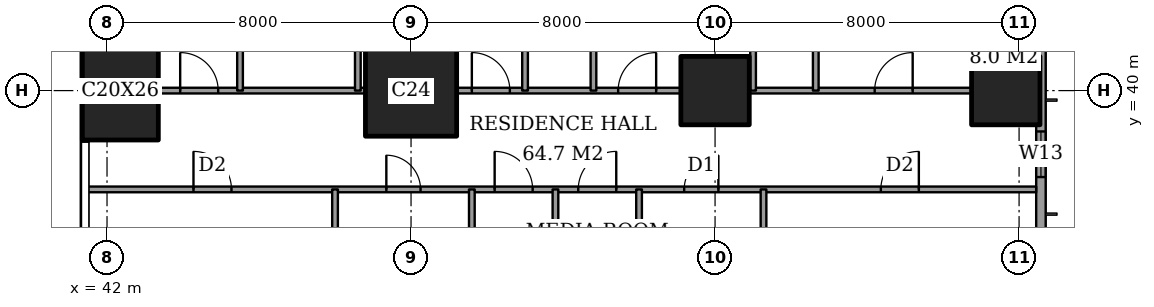
"""IFC4 building model, lengths in metres.
Left out: names, types, materials, properties, quantities, classifications, styles, units other than length and angle.
Written with IfcOpenShell. Run it as: python <this file> out.ifc"""

import sys

from ifc_helpers import new_model, si_unit, direction, frame, frame_2d, origin, origin_2d, place, context, subcontext, project, spatial, rectangle, extrude, element, fill, save


model = new_model("IFC4")
c1 = context("Model", 3, precision=1e-05, world=origin(), true_north=direction((0.0, 1.0)))
c2 = subcontext(c1, "Body", "Model", "MODEL_VIEW")
j1 = project(units=[si_unit("LENGTHUNIT", "METRE"), si_unit("PLANEANGLEUNIT", "RADIAN")], contexts=[c1])
p1 = place(None, origin())
s1 = spatial("IfcSite", under=j1, at=p1, CompositionType="ELEMENT")
p2 = place(p1, origin())
s2 = spatial("IfcBuilding", under=s1, at=p2, CompositionType="ELEMENT")
p3 = place(p2, frame((0.0, 0.0, 214.6)))
s3 = spatial("IfcBuildingStorey", under=s2, at=p3, CompositionType="ELEMENT", Elevation=214.6)
p4 = place(p3, frame((42.35, 40.0, 0.0), z_axis=(0.0, 0.0, 1.0), x_axis=(1.0, 0.0, 0.0)))
e1 = element("IfcColumn", 1, at=p4, inside=s3, PredefinedType="COLUMN", context=c2, shape_type="SweptSolid", body=[
    extrude(rectangle(XDim=2.0, YDim=2.6, at=origin_2d()), origin(), (0.0, 0.0, 1.0), 3.6),
])
p5 = place(p3, frame((50.0, 40.0, 0.0), z_axis=(0.0, 0.0, 1.0), x_axis=(1.0, 0.0, 0.0)))
e2 = element("IfcColumn", 2, at=p5, inside=s3, PredefinedType="COLUMN", context=c2, shape_type="SweptSolid", body=[
    extrude(rectangle(XDim=2.4, YDim=2.4, at=origin_2d()), origin(), (0.0, 0.0, 1.0), 3.6),
])
for number, where, z_axis, x_axis in (
    (3, (58.0, 40.0, 0.0), (0.0, 0.0, 1.0), (1.0, 0.0, 0.0)),
    (4, (65.65, 40.0, 0.0), (0.0, 0.0, 1.0), (1.0, 0.0, 0.0)),
):
    element("IfcColumn", number, at=place(p3, frame(where, z_axis=z_axis, x_axis=x_axis)), inside=s3, PredefinedType="COLUMN", context=c2, shape_type="SweptSolid", body=[
        extrude(rectangle(XDim=1.8, YDim=1.8, at=origin_2d()), origin(), (0.0, 0.0, 1.0), 3.6),
    ])
p6 = place(p3, frame((66.575, 3.175, 0.0), z_axis=(0.0, 0.0, 1.0), x_axis=(0.0, 1.0, 0.0)))
e5 = element("IfcWall", 5, at=p6, inside=s3, PredefinedType="SOLIDWALL", context=c2, shape_type="SweptSolid", body=[
    extrude(rectangle(XDim=41.65, YDim=0.25, at=frame_2d((20.825, 0.0))), origin(), (0.0, 0.0, 1.0), 3.6),
])
p7 = place(p6, frame((0.825, 0.0, 0.2)))
e6 = element("IfcOpeningElement", 6, at=p7, cuts=e5, PredefinedType="OPENING", context=c2, shape_type="SweptSolid", body=[
    extrude(rectangle(XDim=2.4, YDim=2.4, at=frame_2d((1.2, 1.2))), frame((0.0, 0.135, 0.0), z_axis=(0.0, -1.0, 0.0), x_axis=(1.0, 0.0, 0.0)), (0.0, 0.0, 1.0), 0.27),
])
p8 = place(p6, frame((6.225, 0.0, 0.2)))
e7 = element("IfcOpeningElement", 7, at=p8, cuts=e5, PredefinedType="OPENING", context=c2, shape_type="SweptSolid", body=[
    extrude(rectangle(XDim=1.2, YDim=2.4, at=frame_2d((0.6, 1.2))), frame((0.0, 0.135, 0.0), z_axis=(0.0, -1.0, 0.0), x_axis=(1.0, 0.0, 0.0)), (0.0, 0.0, 1.0), 0.27),
])
p9 = place(p6, frame((8.675, 0.0, 0.2)))
e8 = element("IfcOpeningElement", 8, at=p9, cuts=e5, PredefinedType="OPENING", context=c2, shape_type="SweptSolid", body=[
    extrude(rectangle(XDim=2.4, YDim=2.4, at=frame_2d((1.2, 1.2))), frame((0.0, 0.135, 0.0), z_axis=(0.0, -1.0, 0.0), x_axis=(1.0, 0.0, 0.0)), (0.0, 0.0, 1.0), 0.27),
])
p10 = place(p6, frame((15.675, 0.0, 0.2)))
e9 = element("IfcOpeningElement", 9, at=p10, cuts=e5, PredefinedType="OPENING", context=c2, shape_type="SweptSolid", body=[
    extrude(rectangle(XDim=2.4, YDim=2.4, at=frame_2d((1.2, 1.2))), frame((0.0, 0.135, 0.0), z_axis=(0.0, -1.0, 0.0), x_axis=(1.0, 0.0, 0.0)), (0.0, 0.0, 1.0), 0.27),
])
p11 = place(p6, frame((23.575, 0.0, 0.2)))
e10 = element("IfcOpeningElement", 10, at=p11, cuts=e5, PredefinedType="OPENING", context=c2, shape_type="SweptSolid", body=[
    extrude(rectangle(XDim=2.4, YDim=2.4, at=frame_2d((1.2, 1.2))), frame((0.0, 0.135, 0.0), z_axis=(0.0, -1.0, 0.0), x_axis=(1.0, 0.0, 0.0)), (0.0, 0.0, 1.0), 0.27),
])
p12 = place(p6, frame((30.775, 0.0, 0.2)))
e11 = element("IfcOpeningElement", 11, at=p12, cuts=e5, PredefinedType="OPENING", context=c2, shape_type="SweptSolid", body=[
    extrude(rectangle(XDim=2.4, YDim=2.4, at=frame_2d((1.2, 1.2))), frame((0.0, 0.135, 0.0), z_axis=(0.0, -1.0, 0.0), x_axis=(1.0, 0.0, 0.0)), (0.0, 0.0, 1.0), 0.27),
])
p13 = place(p6, frame((34.55, 0.0, 0.2)))
e12 = element("IfcOpeningElement", 12, at=p13, cuts=e5, PredefinedType="OPENING", context=c2, shape_type="SweptSolid", body=[
    extrude(rectangle(XDim=1.2, YDim=2.4, at=frame_2d((0.6, 1.2))), frame((0.0, 0.135, 0.0), z_axis=(0.0, -1.0, 0.0), x_axis=(1.0, 0.0, 0.0)), (0.0, 0.0, 1.0), 0.27),
])
p14 = place(p6, frame((38.425, 0.0, 0.2)))
e13 = element("IfcOpeningElement", 13, at=p14, cuts=e5, PredefinedType="OPENING", context=c2, shape_type="SweptSolid", body=[
    extrude(rectangle(XDim=2.4, YDim=2.4, at=frame_2d((1.2, 1.2))), frame((0.0, 0.135, 0.0), z_axis=(0.0, -1.0, 0.0), x_axis=(1.0, 0.0, 0.0)), (0.0, 0.0, 1.0), 0.27),
])
p15 = place(p3, frame((41.439, 37.4, 0.0), z_axis=(0.0, 0.0, 1.0), x_axis=(1.0, 0.0, 0.0)))
e14 = element("IfcWall", 14, at=p15, inside=s3, PredefinedType="PARTITIONING", context=c2, shape_type="SweptSolid", body=[
    extrude(rectangle(XDim=25.011, YDim=0.15, at=frame_2d((12.505, 0.0))), origin(), (0.0, 0.0, 1.0), 3.35),
])
p16 = place(p15, frame((10.761, 0.0, 0.0)))
e15 = element("IfcOpeningElement", 15, at=p16, cuts=e14, PredefinedType="OPENING", context=c2, shape_type="SweptSolid", body=[
    extrude(rectangle(XDim=1.0, YDim=2.1, at=frame_2d((0.5, 1.05))), frame((0.0, 0.085, 0.0), z_axis=(0.0, -1.0, 0.0), x_axis=(1.0, 0.0, 0.0)), (0.0, 0.0, 1.0), 0.17),
])
p17 = place(p15, frame((20.924, 0.0, 0.0)))
e16 = element("IfcOpeningElement", 16, at=p17, cuts=e14, PredefinedType="OPENING", context=c2, shape_type="SweptSolid", body=[
    extrude(rectangle(XDim=1.0, YDim=2.1, at=frame_2d((0.5, 1.05))), frame((0.0, 0.085, 0.0), z_axis=(0.0, -1.0, 0.0), x_axis=(1.0, 0.0, 0.0)), (0.0, 0.0, 1.0), 0.17),
])
p18 = place(p15, frame((15.749, 0.0, 0.0)))
e17 = element("IfcOpeningElement", 17, at=p18, cuts=e14, PredefinedType="OPENING", context=c2, shape_type="SweptSolid", body=[
    extrude(rectangle(XDim=0.9, YDim=2.1, at=frame_2d((0.45, 1.05))), frame((0.0, 0.085, 0.0), z_axis=(0.0, -1.0, 0.0), x_axis=(1.0, 0.0, 0.0)), (0.0, 0.0, 1.0), 0.17),
])
p19 = place(p15, frame((12.961, 0.0, 0.0)))
e18 = element("IfcOpeningElement", 18, at=p19, cuts=e14, PredefinedType="OPENING", context=c2, shape_type="SweptSolid", body=[
    extrude(rectangle(XDim=1.0, YDim=2.1, at=frame_2d((0.5, 1.05))), frame((0.0, 0.085, 0.0), z_axis=(0.0, -1.0, 0.0), x_axis=(1.0, 0.0, 0.0)), (0.0, 0.0, 1.0), 0.17),
])
p20 = place(p15, frame((7.911, 0.0, 0.0)))
e19 = element("IfcOpeningElement", 19, at=p20, cuts=e14, PredefinedType="OPENING", context=c2, shape_type="SweptSolid", body=[
    extrude(rectangle(XDim=0.9, YDim=2.1, at=frame_2d((0.45, 1.05))), frame((0.0, 0.085, 0.0), z_axis=(0.0, -1.0, 0.0), x_axis=(1.0, 0.0, 0.0)), (0.0, 0.0, 1.0), 0.17),
])
p21 = place(p15, frame((2.836, 0.0, 0.0)))
e20 = element("IfcOpeningElement", 20, at=p21, cuts=e14, PredefinedType="OPENING", context=c2, shape_type="SweptSolid", body=[
    extrude(rectangle(XDim=1.0, YDim=2.1, at=frame_2d((0.5, 1.05))), frame((0.0, 0.085, 0.0), z_axis=(0.0, -1.0, 0.0), x_axis=(1.0, 0.0, 0.0)), (0.0, 0.0, 1.0), 0.17),
])
p22 = place(p3, frame((43.35, 40.0, 0.0), z_axis=(0.0, 0.0, 1.0), x_axis=(1.0, 0.0, 0.0)))
e21 = element("IfcWall", 21, at=p22, inside=s3, PredefinedType="PARTITIONING", context=c2, shape_type="SweptSolid", body=[
    extrude(rectangle(XDim=5.45, YDim=0.15, at=frame_2d((2.725, 0.0))), origin(), (0.0, 0.0, 1.0), 3.35),
])
p23 = place(p22, frame((0.575, 0.0, 0.0)))
e22 = element("IfcOpeningElement", 22, at=p23, cuts=e21, PredefinedType="OPENING", context=c2, shape_type="SweptSolid", body=[
    extrude(rectangle(XDim=1.0, YDim=2.1, at=frame_2d((0.5, 1.05))), frame((0.0, 0.085, 0.0), z_axis=(0.0, -1.0, 0.0), x_axis=(1.0, 0.0, 0.0)), (0.0, 0.0, 1.0), 0.17),
])
p24 = place(p3, frame((51.2, 40.0, 0.0), z_axis=(0.0, 0.0, 1.0), x_axis=(1.0, 0.0, 0.0)))
e23 = element("IfcWall", 23, at=p24, inside=s3, PredefinedType="PARTITIONING", context=c2, shape_type="SweptSolid", body=[
    extrude(rectangle(XDim=5.9, YDim=0.15, at=frame_2d((2.95, 0.0))), origin(), (0.0, 0.0, 1.0), 3.35),
])
p25 = place(p24, frame((4.25, 0.0, 0.0)))
e24 = element("IfcOpeningElement", 24, at=p25, cuts=e23, PredefinedType="OPENING", context=c2, shape_type="SweptSolid", body=[
    extrude(rectangle(XDim=1.0, YDim=2.1, at=frame_2d((0.5, 1.05))), frame((0.0, 0.085, 0.0), z_axis=(0.0, -1.0, 0.0), x_axis=(1.0, 0.0, 0.0)), (0.0, 0.0, 1.0), 0.17),
])
p26 = place(p24, frame((0.4, 0.0, 0.0)))
e25 = element("IfcOpeningElement", 25, at=p26, cuts=e23, PredefinedType="OPENING", context=c2, shape_type="SweptSolid", body=[
    extrude(rectangle(XDim=1.0, YDim=2.1, at=frame_2d((0.5, 1.05))), frame((0.0, 0.085, 0.0), z_axis=(0.0, -1.0, 0.0), x_axis=(1.0, 0.0, 0.0)), (0.0, 0.0, 1.0), 0.17),
])
p27 = place(p3, frame((58.9, 40.0, 0.0), z_axis=(0.0, 0.0, 1.0), x_axis=(1.0, 0.0, 0.0)))
e26 = element("IfcWall", 26, at=p27, inside=s3, PredefinedType="PARTITIONING", context=c2, shape_type="SweptSolid", body=[
    extrude(rectangle(XDim=5.85, YDim=0.15, at=frame_2d((2.925, 0.0))), origin(), (0.0, 0.0, 1.0), 3.35),
])
p28 = place(p27, frame((3.3, 0.0, 0.0)))
e27 = element("IfcOpeningElement", 27, at=p28, cuts=e26, PredefinedType="OPENING", context=c2, shape_type="SweptSolid", body=[
    extrude(rectangle(XDim=1.0, YDim=2.1, at=frame_2d((0.5, 1.05))), frame((0.0, 0.085, 0.0), z_axis=(0.0, -1.0, 0.0), x_axis=(1.0, 0.0, 0.0)), (0.0, 0.0, 1.0), 0.17),
])
p29 = place(p3, frame((45.5, 40.0, 0.0), z_axis=(0.0, 0.0, 1.0), x_axis=(0.0, 1.0, 0.0)))
e28 = element("IfcWall", 28, at=p29, inside=s3, PredefinedType="PARTITIONING", context=c2, shape_type="SweptSolid", body=[
    extrude(rectangle(XDim=8.45, YDim=0.15, at=frame_2d((4.225, 0.0))), origin(), (0.0, 0.0, 1.0), 3.35),
])
p30 = place(p3, frame((48.0, 28.0, 0.0), z_axis=(0.0, 0.0, 1.0), x_axis=(0.0, 1.0, 0.0)))
e29 = element("IfcWall", 29, at=p30, inside=s3, PredefinedType="PARTITIONING", context=c2, shape_type="SweptSolid", body=[
    extrude(rectangle(XDim=9.4, YDim=0.15, at=frame_2d((4.7, 0.0))), origin(), (0.0, 0.0, 1.0), 3.35),
])
p31 = place(p30, frame((0.5, 0.0, 0.0)))
e30 = element("IfcOpeningElement", 30, at=p31, cuts=e29, PredefinedType="OPENING", context=c2, shape_type="SweptSolid", body=[
    extrude(rectangle(XDim=1.0, YDim=2.1, at=frame_2d((0.5, 1.05))), frame((0.0, 0.085, 0.0), z_axis=(0.0, -1.0, 0.0), x_axis=(1.0, 0.0, 0.0)), (0.0, 0.0, 1.0), 0.17),
])
p32 = place(p3, frame((48.6, 40.0, 0.0), z_axis=(0.0, 0.0, 1.0), x_axis=(0.0, 1.0, 0.0)))
e31 = element("IfcWall", 31, at=p32, inside=s3, PredefinedType="PARTITIONING", context=c2, shape_type="SweptSolid", body=[
    extrude(rectangle(XDim=8.45, YDim=0.15, at=frame_2d((4.225, 0.0))), origin(), (0.0, 0.0, 1.0), 3.35),
])
p33 = place(p32, frame((3.775, 0.0, 0.0)))
e32 = element("IfcOpeningElement", 32, at=p33, cuts=e31, PredefinedType="OPENING", context=c2, shape_type="SweptSolid", body=[
    extrude(rectangle(XDim=0.9, YDim=2.1, at=frame_2d((0.45, 1.05))), frame((0.0, 0.085, 0.0), z_axis=(0.0, -1.0, 0.0), x_axis=(1.0, 0.0, 0.0)), (0.0, 0.0, 1.0), 0.17),
])
p34 = place(p3, frame((51.6, 30.0, 0.0), z_axis=(0.0, 0.0, 1.0), x_axis=(0.0, 1.0, 0.0)))
e33 = element("IfcWall", 33, at=p34, inside=s3, PredefinedType="PARTITIONING", context=c2, shape_type="SweptSolid", body=[
    extrude(rectangle(XDim=7.4, YDim=0.15, at=frame_2d((3.7, 0.0))), origin(), (0.0, 0.0, 1.0), 3.35),
])
p35 = place(p3, frame((53.0, 40.0, 0.0), z_axis=(0.0, 0.0, 1.0), x_axis=(0.0, 1.0, 0.0)))
e34 = element("IfcWall", 34, at=p35, inside=s3, PredefinedType="PARTITIONING", context=c2, shape_type="SweptSolid", body=[
    extrude(rectangle(XDim=8.45, YDim=0.15, at=frame_2d((4.225, 0.0))), origin(), (0.0, 0.0, 1.0), 3.35),
])
p36 = place(p3, frame((53.8, 30.0, 0.0), z_axis=(0.0, 0.0, 1.0), x_axis=(0.0, 1.0, 0.0)))
e35 = element("IfcWall", 35, at=p36, inside=s3, PredefinedType="PARTITIONING", context=c2, shape_type="SweptSolid", body=[
    extrude(rectangle(XDim=7.4, YDim=0.15, at=frame_2d((3.7, 0.0))), origin(), (0.0, 0.0, 1.0), 3.35),
])
p37 = place(p3, frame((54.8, 40.0, 0.0), z_axis=(0.0, 0.0, 1.0), x_axis=(0.0, 1.0, 0.0)))
e36 = element("IfcWall", 36, at=p37, inside=s3, PredefinedType="PARTITIONING", context=c2, shape_type="SweptSolid", body=[
    extrude(rectangle(XDim=8.45, YDim=0.15, at=frame_2d((4.225, 0.0))), origin(), (0.0, 0.0, 1.0), 3.35),
])
p38 = place(p37, frame((3.775, 0.0, 0.0)))
e37 = element("IfcOpeningElement", 37, at=p38, cuts=e36, PredefinedType="OPENING", context=c2, shape_type="SweptSolid", body=[
    extrude(rectangle(XDim=0.9, YDim=2.1, at=frame_2d((0.45, 1.05))), frame((0.0, 0.085, 0.0), z_axis=(0.0, -1.0, 0.0), x_axis=(1.0, 0.0, 0.0)), (0.0, 0.0, 1.0), 0.17),
])
p39 = place(p3, frame((56.0, 28.0, 0.0), z_axis=(0.0, 0.0, 1.0), x_axis=(0.0, 1.0, 0.0)))
e38 = element("IfcWall", 38, at=p39, inside=s3, PredefinedType="PARTITIONING", context=c2, shape_type="SweptSolid", body=[
    extrude(rectangle(XDim=9.4, YDim=0.15, at=frame_2d((4.7, 0.0))), origin(), (0.0, 0.0, 1.0), 3.35),
])
p40 = place(p39, frame((0.5, 0.0, 0.0)))
e39 = element("IfcOpeningElement", 39, at=p40, cuts=e38, PredefinedType="OPENING", context=c2, shape_type="SweptSolid", body=[
    extrude(rectangle(XDim=1.0, YDim=2.1, at=frame_2d((0.5, 1.05))), frame((0.0, 0.085, 0.0), z_axis=(0.0, -1.0, 0.0), x_axis=(1.0, 0.0, 0.0)), (0.0, 0.0, 1.0), 0.17),
])
p41 = place(p3, frame((59.0, 40.0, 0.0), z_axis=(0.0, 0.0, 1.0), x_axis=(0.0, 1.0, 0.0)))
e40 = element("IfcWall", 40, at=p41, inside=s3, PredefinedType="PARTITIONING", context=c2, shape_type="SweptSolid", body=[
    extrude(rectangle(XDim=8.45, YDim=0.15, at=frame_2d((4.225, 0.0))), origin(), (0.0, 0.0, 1.0), 3.35),
])
p42 = place(p3, frame((59.275, 33.2, 0.0), z_axis=(0.0, 0.0, 1.0), x_axis=(0.0, 1.0, 0.0)))
e41 = element("IfcWall", 41, at=p42, inside=s3, PredefinedType="PARTITIONING", context=c2, shape_type="SweptSolid", body=[
    extrude(rectangle(XDim=4.2, YDim=0.15, at=frame_2d((2.1, 0.0))), origin(), (0.0, 0.0, 1.0), 3.35),
])
p43 = place(p3, frame((60.65, 40.0, 0.0), z_axis=(0.0, 0.0, 1.0), x_axis=(0.0, 1.0, 0.0)))
e42 = element("IfcWall", 42, at=p43, inside=s3, PredefinedType="PARTITIONING", context=c2, shape_type="SweptSolid", body=[
    extrude(rectangle(XDim=8.45, YDim=0.15, at=frame_2d((4.225, 0.0))), origin(), (0.0, 0.0, 1.0), 3.35),
])
p44 = place(p43, frame((3.775, 0.0, 0.0)))
e43 = element("IfcOpeningElement", 43, at=p44, cuts=e42, PredefinedType="OPENING", context=c2, shape_type="SweptSolid", body=[
    extrude(rectangle(XDim=0.9, YDim=2.1, at=frame_2d((0.45, 1.05))), frame((0.0, 0.085, 0.0), z_axis=(0.0, -1.0, 0.0), x_axis=(1.0, 0.0, 0.0)), (0.0, 0.0, 1.0), 0.17),
])
p45 = place(p3, frame((64.75, 40.9, 0.0), z_axis=(0.0, 0.0, 1.0), x_axis=(0.0, 1.0, 0.0)))
e44 = element("IfcWall", 44, at=p45, inside=s3, PredefinedType="PARTITIONING", context=c2, shape_type="SweptSolid", body=[
    extrude(rectangle(XDim=3.8, YDim=0.15, at=frame_2d((1.9, 0.0))), origin(), (0.0, 0.0, 1.0), 3.35),
])
p46 = place(p45, frame((1.45, 0.0, 0.0)))
e45 = element("IfcOpeningElement", 45, at=p46, cuts=e44, PredefinedType="OPENING", context=c2, shape_type="SweptSolid", body=[
    extrude(rectangle(XDim=0.9, YDim=2.1, at=frame_2d((0.45, 1.05))), frame((0.0, 0.085, 0.0), z_axis=(0.0, -1.0, 0.0), x_axis=(1.0, 0.0, 0.0)), (0.0, 0.0, 1.0), 0.17),
])
p47 = place(p13, origin())
e46 = element("IfcWindow", 46, at=p47, inside=s3, PartitioningType="SINGLE_PANEL", PredefinedType="WINDOW", context=c2, shape_type="SweptSolid", body=[
    extrude(rectangle(XDim=1.2, YDim=2.4, at=frame_2d((0.6, 1.2))), frame((0.0, 0.03, 0.0), z_axis=(0.0, -1.0, 0.0), x_axis=(1.0, 0.0, 0.0)), (0.0, 0.0, 1.0), 0.06),
])
fill(e12, e46)
p48 = place(p28, origin())
e47 = element("IfcDoor", 47, at=p48, inside=s3, OperationType="SINGLE_SWING_LEFT", PredefinedType="DOOR", context=c2, shape_type="SweptSolid", body=[
    extrude(rectangle(XDim=1.0, YDim=2.1, at=frame_2d((0.5, 1.05))), frame((0.0, 0.025, 0.0), z_axis=(0.0, -1.0, 0.0), x_axis=(1.0, 0.0, 0.0)), (0.0, 0.0, 1.0), 0.05),
])
fill(e27, e47)
p49 = place(p25, origin())
e48 = element("IfcDoor", 48, at=p49, inside=s3, OperationType="SINGLE_SWING_LEFT", PredefinedType="DOOR", context=c2, shape_type="SweptSolid", body=[
    extrude(rectangle(XDim=1.0, YDim=2.1, at=frame_2d((0.5, 1.05))), frame((0.0, 0.025, 0.0), z_axis=(0.0, -1.0, 0.0), x_axis=(1.0, 0.0, 0.0)), (0.0, 0.0, 1.0), 0.05),
])
fill(e24, e48)
p50 = place(p26, origin())
e49 = element("IfcDoor", 49, at=p50, inside=s3, OperationType="SINGLE_SWING_RIGHT", PredefinedType="DOOR", context=c2, shape_type="SweptSolid", body=[
    extrude(rectangle(XDim=1.0, YDim=2.1, at=frame_2d((0.5, 1.05))), frame((0.0, 0.025, 0.0), z_axis=(0.0, -1.0, 0.0), x_axis=(1.0, 0.0, 0.0)), (0.0, 0.0, 1.0), 0.05),
])
fill(e25, e49)
p51 = place(p23, origin())
e50 = element("IfcDoor", 50, at=p51, inside=s3, OperationType="SINGLE_SWING_RIGHT", PredefinedType="DOOR", context=c2, shape_type="SweptSolid", body=[
    extrude(rectangle(XDim=1.0, YDim=2.1, at=frame_2d((0.5, 1.05))), frame((0.0, 0.025, 0.0), z_axis=(0.0, -1.0, 0.0), x_axis=(1.0, 0.0, 0.0)), (0.0, 0.0, 1.0), 0.05),
])
fill(e22, e50)
p52 = place(p16, origin())
e51 = element("IfcDoor", 51, at=p52, inside=s3, OperationType="SINGLE_SWING_RIGHT", PredefinedType="DOOR", context=c2, shape_type="SweptSolid", body=[
    extrude(rectangle(XDim=1.0, YDim=2.1, at=frame_2d((0.5, 1.05))), frame((0.0, 0.025, 0.0), z_axis=(0.0, -1.0, 0.0), x_axis=(1.0, 0.0, 0.0)), (0.0, 0.0, 1.0), 0.05),
])
fill(e15, e51)
p53 = place(p17, origin())
e52 = element("IfcDoor", 52, at=p53, inside=s3, OperationType="SINGLE_SWING_LEFT", PredefinedType="DOOR", context=c2, shape_type="SweptSolid", body=[
    extrude(rectangle(XDim=1.0, YDim=2.1, at=frame_2d((0.5, 1.05))), frame((0.0, 0.025, 0.0), z_axis=(0.0, -1.0, 0.0), x_axis=(1.0, 0.0, 0.0)), (0.0, 0.0, 1.0), 0.05),
])
fill(e16, e52)
p54 = place(p18, origin())
e53 = element("IfcDoor", 53, at=p54, inside=s3, OperationType="SINGLE_SWING_LEFT", PredefinedType="DOOR", context=c2, shape_type="SweptSolid", body=[
    extrude(rectangle(XDim=0.9, YDim=2.1, at=frame_2d((0.45, 1.05))), frame((0.0, 0.025, 0.0), z_axis=(0.0, -1.0, 0.0), x_axis=(1.0, 0.0, 0.0)), (0.0, 0.0, 1.0), 0.05),
])
fill(e17, e53)
p55 = place(p19, origin())
e54 = element("IfcDoor", 54, at=p55, inside=s3, OperationType="SINGLE_SWING_LEFT", PredefinedType="DOOR", context=c2, shape_type="SweptSolid", body=[
    extrude(rectangle(XDim=1.0, YDim=2.1, at=frame_2d((0.5, 1.05))), frame((0.0, 0.025, 0.0), z_axis=(0.0, -1.0, 0.0), x_axis=(1.0, 0.0, 0.0)), (0.0, 0.0, 1.0), 0.05),
])
fill(e18, e54)
p56 = place(p20, origin())
e55 = element("IfcDoor", 55, at=p56, inside=s3, OperationType="SINGLE_SWING_RIGHT", PredefinedType="DOOR", context=c2, shape_type="SweptSolid", body=[
    extrude(rectangle(XDim=0.9, YDim=2.1, at=frame_2d((0.45, 1.05))), frame((0.0, 0.025, 0.0), z_axis=(0.0, -1.0, 0.0), x_axis=(1.0, 0.0, 0.0)), (0.0, 0.0, 1.0), 0.05),
])
fill(e19, e55)
p57 = place(p21, origin())
e56 = element("IfcDoor", 56, at=p57, inside=s3, OperationType="SINGLE_SWING_RIGHT", PredefinedType="DOOR", context=c2, shape_type="SweptSolid", body=[
    extrude(rectangle(XDim=1.0, YDim=2.1, at=frame_2d((0.5, 1.05))), frame((0.0, 0.025, 0.0), z_axis=(0.0, -1.0, 0.0), x_axis=(1.0, 0.0, 0.0)), (0.0, 0.0, 1.0), 0.05),
])
fill(e20, e56)
save(model, sys.argv[1])
